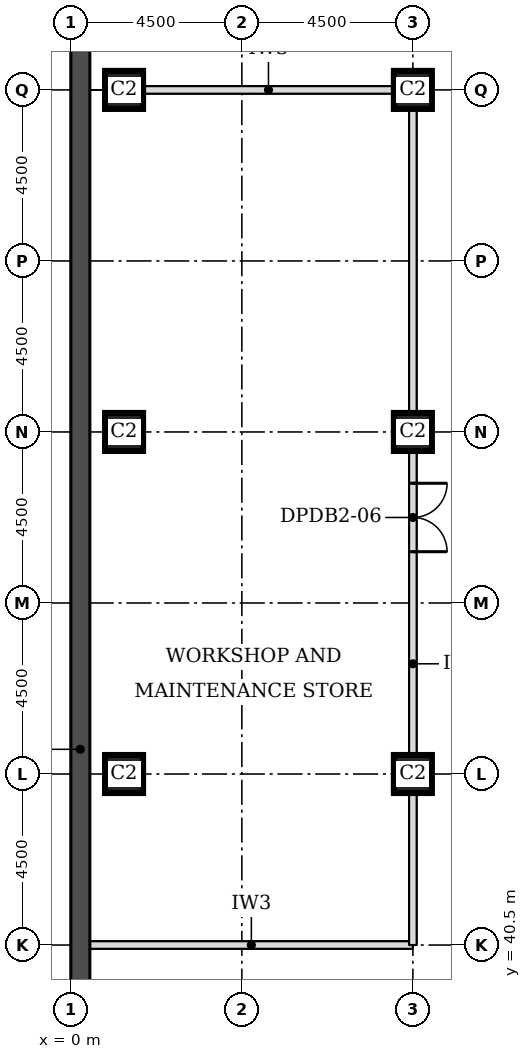
"""IFC4 building model, lengths in metres.
Left out: names, types, materials, properties, quantities, classifications, styles, units other than length and angle.
Written with IfcOpenShell. Run it as: python <this file> out.ifc"""

import sys

from ifc_helpers import new_model, si_unit, direction, frame, frame_2d, origin, origin_2d, place, context, subcontext, project, spatial, rectangle, extrude, element, fill, save


model = new_model("IFC4")
c1 = context("Model", 3, precision=1e-05, world=origin(), true_north=direction((0.0, 1.0)))
c2 = subcontext(c1, "Body", "Model", "MODEL_VIEW")
j1 = project(units=[si_unit("LENGTHUNIT", "METRE"), si_unit("PLANEANGLEUNIT", "RADIAN")], contexts=[c1])
p1 = place(None, origin())
s1 = spatial("IfcSite", under=j1, at=p1, CompositionType="ELEMENT")
p2 = place(p1, origin())
s2 = spatial("IfcBuilding", under=s1, at=p2, CompositionType="ELEMENT")
p3 = place(p2, frame((0.0, 0.0, -9.0)))
s3 = spatial("IfcBuildingStorey", under=s2, at=p3, CompositionType="ELEMENT", Elevation=-9.0)
p4 = place(p3, frame((0.25, 0.5, -0.4), z_axis=(0.0, 0.0, 1.0), x_axis=(0.0, 1.0, 0.0)))
e1 = element("IfcWall", 1, at=p4, inside=s3, PredefinedType="SOLIDWALL", context=c2, shape_type="SweptSolid", body=[
    extrude(rectangle(XDim=93.5, YDim=0.5, at=frame_2d((46.75, 0.0))), origin(), (0.0, 0.0, 1.0), 4.5),
])
for number, where, z_axis, x_axis in (
    (2, (9.0, 45.0, -0.4), (0.0, 0.0, 1.0), (1.0, 0.0, 0.0)),
    (3, (9.0, 54.0, -0.4), (0.0, 0.0, 1.0), (1.0, 0.0, 0.0)),
    (4, (9.0, 63.0, -0.4), (0.0, 0.0, 1.0), (1.0, 0.0, 0.0)),
    (5, (1.4, 45.0, -0.4), (0.0, 0.0, 1.0), (1.0, 0.0, 0.0)),
    (6, (1.4, 54.0, -0.4), (0.0, 0.0, 1.0), (1.0, 0.0, 0.0)),
    (7, (1.4, 63.0, -0.4), (0.0, 0.0, 1.0), (1.0, 0.0, 0.0)),
):
    element("IfcColumn", number, at=place(p3, frame(where, z_axis=z_axis, x_axis=x_axis)), inside=s3, PredefinedType="COLUMN", context=c2, shape_type="SweptSolid", body=[
        extrude(rectangle(XDim=1.0, YDim=1.0, at=origin_2d()), origin(), (0.0, 0.0, 1.0), 4.9),
    ])
p5 = place(p3, frame((0.5, 40.5, 0.0), z_axis=(0.0, 0.0, 1.0), x_axis=(1.0, 0.0, 0.0)))
e8 = element("IfcWall", 8, at=p5, inside=s3, PredefinedType="PARTITIONING", context=c2, shape_type="SweptSolid", body=[
    extrude(rectangle(XDim=8.5, YDim=0.2, at=frame_2d((4.25, 0.0))), origin(), (0.0, 0.0, 1.0), 4.1),
])
p6 = place(p3, frame((9.0, 40.5, 0.0), z_axis=(0.0, 0.0, 1.0), x_axis=(0.0, 1.0, 0.0)))
e9 = element("IfcWall", 9, at=p6, inside=s3, PredefinedType="PARTITIONING", context=c2, shape_type="SweptSolid", body=[
    extrude(rectangle(XDim=4.0, YDim=0.2, at=frame_2d((2.0, 0.0))), origin(), (0.0, 0.0, 1.0), 4.1),
])
p7 = place(p3, frame((9.0, 45.5, 0.0), z_axis=(0.0, 0.0, 1.0), x_axis=(0.0, 1.0, 0.0)))
e10 = element("IfcWall", 10, at=p7, inside=s3, PredefinedType="PARTITIONING", context=c2, shape_type="SweptSolid", body=[
    extrude(rectangle(XDim=8.0, YDim=0.2, at=frame_2d((4.0, 0.0))), origin(), (0.0, 0.0, 1.0), 4.1),
])
p8 = place(p7, frame((5.35, 0.0, 0.0)))
e11 = element("IfcOpeningElement", 11, at=p8, cuts=e10, PredefinedType="OPENING", context=c2, shape_type="SweptSolid", body=[
    extrude(rectangle(XDim=1.8, YDim=2.1, at=frame_2d((0.9, 1.05))), frame((0.0, 0.11, 0.0), z_axis=(0.0, -1.0, 0.0), x_axis=(1.0, 0.0, 0.0)), (0.0, 0.0, 1.0), 0.22),
])
p9 = place(p3, frame((9.0, 54.5, 0.0), z_axis=(0.0, 0.0, 1.0), x_axis=(0.0, 1.0, 0.0)))
e12 = element("IfcWall", 12, at=p9, inside=s3, PredefinedType="PARTITIONING", context=c2, shape_type="SweptSolid", body=[
    extrude(rectangle(XDim=8.0, YDim=0.2, at=frame_2d((4.0, 0.0))), origin(), (0.0, 0.0, 1.0), 4.1),
])
p10 = place(p3, frame((1.9, 63.0, 0.0), z_axis=(0.0, 0.0, 1.0), x_axis=(1.0, 0.0, 0.0)))
e13 = element("IfcWall", 13, at=p10, inside=s3, PredefinedType="PARTITIONING", context=c2, shape_type="SweptSolid", body=[
    extrude(rectangle(XDim=6.6, YDim=0.2, at=frame_2d((3.3, 0.0))), origin(), (0.0, 0.0, 1.0), 4.1),
])
p11 = place(p8, frame((1.8, 0.0, 0.0), z_axis=(0.0, 0.0, 1.0), x_axis=(-1.0, 0.0, 0.0)))
e14 = element("IfcDoor", 14, at=p11, inside=s3, OperationType="DOUBLE_DOOR_SINGLE_SWING", PredefinedType="DOOR", context=c2, shape_type="SweptSolid", body=[
    extrude(rectangle(XDim=1.8, YDim=2.1, at=frame_2d((0.9, 1.05))), frame((0.0, 0.025, 0.0), z_axis=(0.0, -1.0, 0.0), x_axis=(1.0, 0.0, 0.0)), (0.0, 0.0, 1.0), 0.05),
])
fill(e11, e14)
save(model, sys.argv[1])
